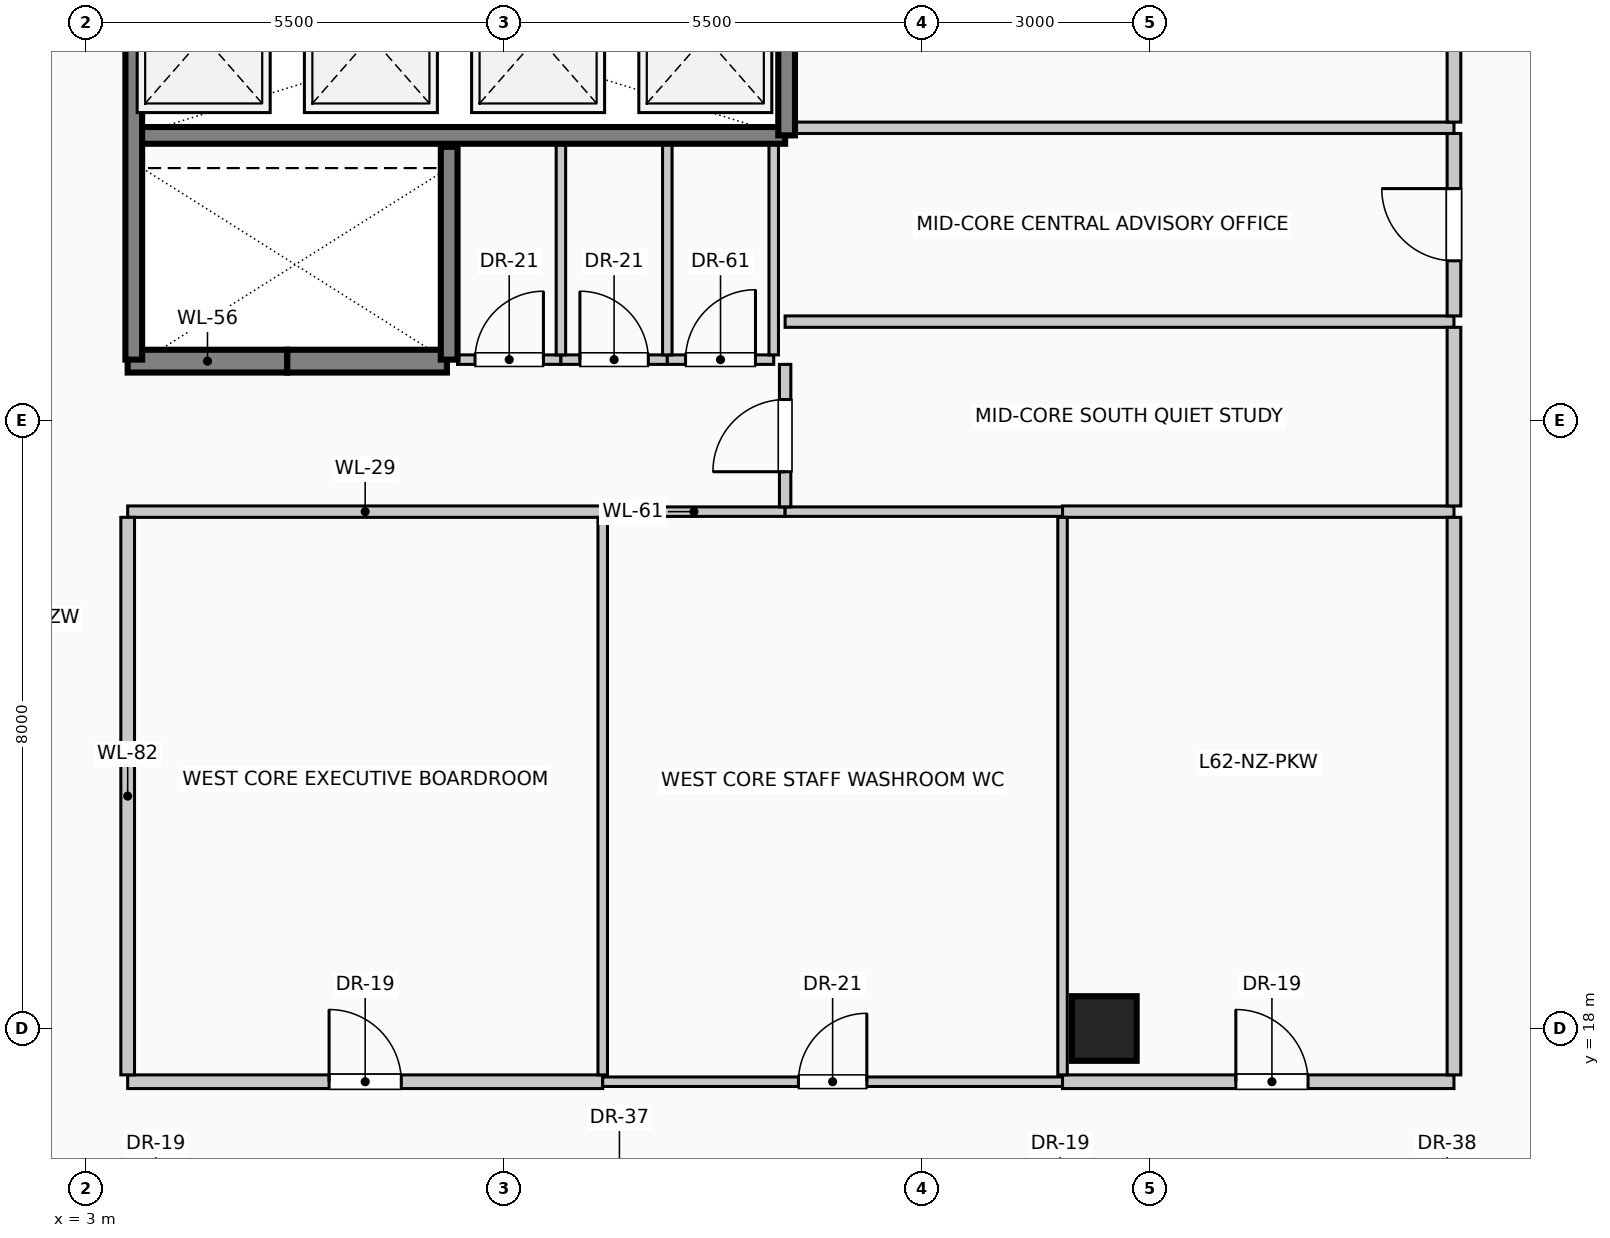
"""IFC4 building model, lengths in metres.
Left out: names, types, materials, properties, quantities, classifications, styles, units other than length and angle.
Written with IfcOpenShell. Run it as: python <this file> out.ifc"""

import sys

from ifc_helpers import new_model, si_unit, direction, frame, frame_2d, origin, origin_2d, place, context, subcontext, project, spatial, rectangle, circle, extrude, element, fill, save


model = new_model("IFC4")
c1 = context("Model", 3, precision=1e-05, world=origin(), true_north=direction((0.0, 1.0)))
c2 = subcontext(c1, "Body", "Model", "MODEL_VIEW")
j1 = project(units=[si_unit("LENGTHUNIT", "METRE"), si_unit("PLANEANGLEUNIT", "RADIAN")], contexts=[c1])
p1 = place(None, origin())
s1 = spatial("IfcSite", under=j1, at=p1, CompositionType="ELEMENT")
p2 = place(p1, origin())
s2 = spatial("IfcBuilding", under=s1, at=p2, CompositionType="ELEMENT")
p3 = place(p2, frame((0.0, 0.0, 256.6)))
s3 = spatial("IfcBuildingStorey", under=s2, at=p3, CompositionType="ELEMENT", Elevation=256.6)
p4 = place(p3, frame((16.4, 18.0, 0.0), z_axis=(0.0, 0.0, 1.0), x_axis=(1.0, 0.0, 0.0)))
e1 = element("IfcColumn", 1, at=p4, inside=s3, PredefinedType="COLUMN", context=c2, shape_type="SweptSolid", body=[
    extrude(circle(Radius=0.425, at=origin_2d()), origin(), (0.0, 0.0, 1.0), 4.0),
])
p5 = place(p3, frame((5.65, 26.78, 0.0), z_axis=(0.0, 0.0, 1.0), x_axis=(-1.0, 0.0, 0.0)))
e2 = element("IfcWall", 2, at=p5, inside=s3, PredefinedType="SOLIDWALL", context=c2, shape_type="SweptSolid", body=[
    extrude(rectangle(XDim=2.1, YDim=0.3, at=frame_2d((1.05, 0.0))), origin(), (0.0, 0.0, 1.0), 4.0),
])
p6 = place(p3, frame((7.75, 26.78, 0.0), z_axis=(0.0, 0.0, 1.0), x_axis=(-1.0, 0.0, 0.0)))
e3 = element("IfcWall", 3, at=p6, inside=s3, PredefinedType="SOLIDWALL", context=c2, shape_type="SweptSolid", body=[
    extrude(rectangle(XDim=2.1, YDim=0.3, at=frame_2d((1.05, 0.0))), origin(), (0.0, 0.0, 1.0), 4.0),
])
p7 = place(p3, frame((3.55, 29.75, 0.0), z_axis=(0.0, 0.0, 1.0), x_axis=(1.0, 0.0, 0.0)))
e4 = element("IfcWall", 4, at=p7, inside=s3, PredefinedType="SOLIDWALL", context=c2, shape_type="SweptSolid", body=[
    extrude(rectangle(XDim=8.65, YDim=0.22, at=frame_2d((4.325, 0.0))), origin(), (0.0, 0.0, 1.0), 4.0),
])
p8 = place(p3, frame((3.63, 26.8, 0.0), z_axis=(0.0, 0.0, 1.0), x_axis=(0.0, 1.0, 0.0)))
e5 = element("IfcWall", 5, at=p8, inside=s3, PredefinedType="SOLIDWALL", context=c2, shape_type="SweptSolid", body=[
    extrude(rectangle(XDim=5.55, YDim=0.22, at=frame_2d((2.775, 0.0))), origin(), (0.0, 0.0, 1.0), 4.0),
])
p9 = place(p3, frame((7.78, 26.8, 0.0), z_axis=(0.0, 0.0, 1.0), x_axis=(0.0, 1.0, 0.0)))
e6 = element("IfcWall", 6, at=p9, inside=s3, PredefinedType="SOLIDWALL", context=c2, shape_type="SweptSolid", body=[
    extrude(rectangle(XDim=2.8, YDim=0.22, at=frame_2d((1.4, 0.0))), origin(), (0.0, 0.0, 1.0), 4.0),
])
p10 = place(p3, frame((12.22, 29.75, 0.0), z_axis=(0.0, 0.0, 1.0), x_axis=(0.0, 1.0, 0.0)))
e7 = element("IfcWall", 7, at=p10, inside=s3, PredefinedType="SOLIDWALL", context=c2, shape_type="SweptSolid", body=[
    extrude(rectangle(XDim=2.6, YDim=0.22, at=frame_2d((1.3, 0.0))), origin(), (0.0, 0.0, 1.0), 4.0),
])
p11 = place(p3, frame((3.55, 17.3, 0.0), z_axis=(0.0, 0.0, 1.0), x_axis=(1.0, 0.0, 0.0)))
e8 = element("IfcWall", 8, at=p11, inside=s3, PredefinedType="PARTITIONING", context=c2, shape_type="SweptSolid", body=[
    extrude(rectangle(XDim=6.25, YDim=0.18, at=frame_2d((3.125, 0.0))), origin(), (0.0, 0.0, 1.0), 3.75),
])
p12 = place(p11, frame((2.65, 0.0, 0.0)))
e9 = element("IfcOpeningElement", 9, at=p12, cuts=e8, PredefinedType="OPENING", context=c2, shape_type="SweptSolid", body=[
    extrude(rectangle(XDim=0.95, YDim=2.15, at=frame_2d((0.475, 1.075))), frame((0.0, 0.1, 0.0), z_axis=(0.0, -1.0, 0.0), x_axis=(1.0, 0.0, 0.0)), (0.0, 0.0, 1.0), 0.2),
])
p13 = place(p3, frame((9.8, 17.3, 0.0), z_axis=(0.0, 0.0, 1.0), x_axis=(1.0, 0.0, 0.0)))
e10 = element("IfcWall", 10, at=p13, inside=s3, PredefinedType="PARTITIONING", context=c2, shape_type="SweptSolid", body=[
    extrude(rectangle(XDim=6.05, YDim=0.125, at=frame_2d((3.025, 0.0))), origin(), (0.0, 0.0, 1.0), 3.75),
])
p14 = place(p13, frame((2.575, 0.0, 0.0)))
e11 = element("IfcOpeningElement", 11, at=p14, cuts=e10, PredefinedType="OPENING", context=c2, shape_type="SweptSolid", body=[
    extrude(rectangle(XDim=0.9, YDim=2.1, at=frame_2d((0.45, 1.05))), frame((0.0, 0.073, 0.0), z_axis=(0.0, -1.0, 0.0), x_axis=(1.0, 0.0, 0.0)), (0.0, 0.0, 1.0), 0.145),
])
p15 = place(p3, frame((15.85, 17.3, 0.0), z_axis=(0.0, 0.0, 1.0), x_axis=(1.0, 0.0, 0.0)))
e12 = element("IfcWall", 12, at=p15, inside=s3, PredefinedType="PARTITIONING", context=c2, shape_type="SweptSolid", body=[
    extrude(rectangle(XDim=5.15, YDim=0.18, at=frame_2d((2.575, 0.0))), origin(), (0.0, 0.0, 1.0), 3.75),
])
p16 = place(p15, frame((2.28, 0.0, 0.0)))
e13 = element("IfcOpeningElement", 13, at=p16, cuts=e12, PredefinedType="OPENING", context=c2, shape_type="SweptSolid", body=[
    extrude(rectangle(XDim=0.95, YDim=2.15, at=frame_2d((0.475, 1.075))), frame((0.0, 0.1, 0.0), z_axis=(0.0, -1.0, 0.0), x_axis=(1.0, 0.0, 0.0)), (0.0, 0.0, 1.0), 0.2),
])
p17 = place(p3, frame((3.55, 24.8, 0.0), z_axis=(0.0, 0.0, 1.0), x_axis=(1.0, 0.0, 0.0)))
e14 = element("IfcWall", 14, at=p17, inside=s3, PredefinedType="PARTITIONING", context=c2, shape_type="SweptSolid", body=[
    extrude(rectangle(XDim=6.25, YDim=0.15, at=frame_2d((3.125, 0.0))), origin(), (0.0, 0.0, 1.0), 3.75),
])
p18 = place(p3, frame((9.8, 24.8, 0.0), z_axis=(0.0, 0.0, 1.0), x_axis=(1.0, 0.0, 0.0)))
e15 = element("IfcWall", 15, at=p18, inside=s3, PredefinedType="PARTITIONING", context=c2, shape_type="SweptSolid", body=[
    extrude(rectangle(XDim=2.4, YDim=0.125, at=frame_2d((1.2, 0.0))), origin(), (0.0, 0.0, 1.0), 3.75),
])
p19 = place(p3, frame((12.2, 24.8, 0.0), z_axis=(0.0, 0.0, 1.0), x_axis=(1.0, 0.0, 0.0)))
e16 = element("IfcWall", 16, at=p19, inside=s3, PredefinedType="PARTITIONING", context=c2, shape_type="SweptSolid", body=[
    extrude(rectangle(XDim=3.65, YDim=0.125, at=frame_2d((1.825, 0.0))), origin(), (0.0, 0.0, 1.0), 3.75),
])
p20 = place(p3, frame((15.85, 24.8, 0.0), z_axis=(0.0, 0.0, 1.0), x_axis=(1.0, 0.0, 0.0)))
e17 = element("IfcWall", 17, at=p20, inside=s3, PredefinedType="PARTITIONING", context=c2, shape_type="SweptSolid", body=[
    extrude(rectangle(XDim=5.15, YDim=0.15, at=frame_2d((2.575, 0.0))), origin(), (0.0, 0.0, 1.0), 3.75),
])
p21 = place(p3, frame((7.89, 26.8, 0.0), z_axis=(0.0, 0.0, 1.0), x_axis=(1.0, 0.0, 0.0)))
e18 = element("IfcWall", 18, at=p21, inside=s3, PredefinedType="PARTITIONING", context=c2, shape_type="SweptSolid", body=[
    extrude(rectangle(XDim=1.36, YDim=0.125, at=frame_2d((0.68, 0.0))), origin(), (0.0, 0.0, 1.0), 3.75),
])
p22 = place(p21, frame((0.23, 0.0, 0.0)))
e19 = element("IfcOpeningElement", 19, at=p22, cuts=e18, PredefinedType="OPENING", context=c2, shape_type="SweptSolid", body=[
    extrude(rectangle(XDim=0.9, YDim=2.1, at=frame_2d((0.45, 1.05))), frame((0.0, 0.073, 0.0), z_axis=(0.0, -1.0, 0.0), x_axis=(1.0, 0.0, 0.0)), (0.0, 0.0, 1.0), 0.145),
])
p23 = place(p3, frame((9.25, 26.8, 0.0), z_axis=(0.0, 0.0, 1.0), x_axis=(1.0, 0.0, 0.0)))
e20 = element("IfcWall", 20, at=p23, inside=s3, PredefinedType="PARTITIONING", context=c2, shape_type="SweptSolid", body=[
    extrude(rectangle(XDim=1.4, YDim=0.125, at=frame_2d((0.7, 0.0))), origin(), (0.0, 0.0, 1.0), 3.75),
])
p24 = place(p23, frame((0.25, 0.0, 0.0)))
e21 = element("IfcOpeningElement", 21, at=p24, cuts=e20, PredefinedType="OPENING", context=c2, shape_type="SweptSolid", body=[
    extrude(rectangle(XDim=0.9, YDim=2.1, at=frame_2d((0.45, 1.05))), frame((0.0, 0.073, 0.0), z_axis=(0.0, -1.0, 0.0), x_axis=(1.0, 0.0, 0.0)), (0.0, 0.0, 1.0), 0.145),
])
p25 = place(p3, frame((10.65, 26.8, 0.0), z_axis=(0.0, 0.0, 1.0), x_axis=(1.0, 0.0, 0.0)))
e22 = element("IfcWall", 22, at=p25, inside=s3, PredefinedType="PARTITIONING", context=c2, shape_type="SweptSolid", body=[
    extrude(rectangle(XDim=1.4, YDim=0.125, at=frame_2d((0.7, 0.0))), origin(), (0.0, 0.0, 1.0), 3.75),
])
p26 = place(p25, frame((0.24, 0.0, 0.0)))
e23 = element("IfcOpeningElement", 23, at=p26, cuts=e22, PredefinedType="OPENING", context=c2, shape_type="SweptSolid", body=[
    extrude(rectangle(XDim=0.92, YDim=2.1, at=frame_2d((0.46, 1.05))), frame((0.0, 0.073, 0.0), z_axis=(0.0, -1.0, 0.0), x_axis=(1.0, 0.0, 0.0)), (0.0, 0.0, 1.0), 0.145),
])
p27 = place(p3, frame((12.2, 27.3, 0.0), z_axis=(0.0, 0.0, 1.0), x_axis=(1.0, 0.0, 0.0)))
e24 = element("IfcWall", 24, at=p27, inside=s3, PredefinedType="PARTITIONING", context=c2, shape_type="SweptSolid", body=[
    extrude(rectangle(XDim=8.8, YDim=0.15, at=frame_2d((4.4, 0.0))), origin(), (0.0, 0.0, 1.0), 3.75),
])
p28 = place(p3, frame((12.33, 29.85, 0.0), z_axis=(0.0, 0.0, 1.0), x_axis=(1.0, 0.0, 0.0)))
e25 = element("IfcWall", 25, at=p28, inside=s3, PredefinedType="PARTITIONING", context=c2, shape_type="SweptSolid", body=[
    extrude(rectangle(XDim=8.67, YDim=0.15, at=frame_2d((4.335, 0.0))), origin(), (0.0, 0.0, 1.0), 3.75),
])
p29 = place(p3, frame((3.55, 17.39, 0.0), z_axis=(0.0, 0.0, 1.0), x_axis=(0.0, 1.0, 0.0)))
e26 = element("IfcWall", 26, at=p29, inside=s3, PredefinedType="PARTITIONING", context=c2, shape_type="SweptSolid", body=[
    extrude(rectangle(XDim=7.335, YDim=0.18, at=frame_2d((3.667, 0.0))), origin(), (0.0, 0.0, 1.0), 3.75),
])
p30 = place(p3, frame((9.25, 26.863, 0.0), z_axis=(0.0, 0.0, 1.0), x_axis=(0.0, 1.0, 0.0)))
e27 = element("IfcWall", 27, at=p30, inside=s3, PredefinedType="PARTITIONING", context=c2, shape_type="SweptSolid", body=[
    extrude(rectangle(XDim=2.777, YDim=0.125, at=frame_2d((1.389, 0.0))), origin(), (0.0, 0.0, 1.0), 3.75),
])
p31 = place(p3, frame((9.8, 17.39, 0.0), z_axis=(0.0, 0.0, 1.0), x_axis=(0.0, 1.0, 0.0)))
e28 = element("IfcWall", 28, at=p31, inside=s3, PredefinedType="PARTITIONING", context=c2, shape_type="SweptSolid", body=[
    extrude(rectangle(XDim=7.335, YDim=0.125, at=frame_2d((3.667, 0.0))), origin(), (0.0, 0.0, 1.0), 3.75),
])
for number, where, z_axis, x_axis in (
    (29, (10.65, 26.863, 0.0), (0.0, 0.0, 1.0), (0.0, 1.0, 0.0)),
    (30, (12.05, 26.863, 0.0), (0.0, 0.0, 1.0), (0.0, 1.0, 0.0)),
):
    element("IfcWall", number, at=place(p3, frame(where, z_axis=z_axis, x_axis=x_axis)), inside=s3, PredefinedType="PARTITIONING", context=c2, shape_type="SweptSolid", body=[
        extrude(rectangle(XDim=2.777, YDim=0.125, at=frame_2d((1.389, 0.0))), origin(), (0.0, 0.0, 1.0), 3.75),
    ])
p32 = place(p3, frame((12.2, 24.863, 0.0), z_axis=(0.0, 0.0, 1.0), x_axis=(0.0, 1.0, 0.0)))
e31 = element("IfcWall", 31, at=p32, inside=s3, PredefinedType="PARTITIONING", context=c2, shape_type="SweptSolid", body=[
    extrude(rectangle(XDim=1.875, YDim=0.15, at=frame_2d((0.938, 0.0))), origin(), (0.0, 0.0, 1.0), 3.75),
])
p33 = place(p32, frame((0.462, 0.0, 0.0)))
e32 = element("IfcOpeningElement", 32, at=p33, cuts=e31, PredefinedType="OPENING", context=c2, shape_type="SweptSolid", body=[
    extrude(rectangle(XDim=0.95, YDim=2.15, at=frame_2d((0.475, 1.075))), frame((0.0, 0.085, 0.0), z_axis=(0.0, -1.0, 0.0), x_axis=(1.0, 0.0, 0.0)), (0.0, 0.0, 1.0), 0.17),
])
p34 = place(p3, frame((15.85, 17.39, 0.0), z_axis=(0.0, 0.0, 1.0), x_axis=(0.0, 1.0, 0.0)))
e33 = element("IfcWall", 33, at=p34, inside=s3, PredefinedType="PARTITIONING", context=c2, shape_type="SweptSolid", body=[
    extrude(rectangle(XDim=7.335, YDim=0.125, at=frame_2d((3.667, 0.0))), origin(), (0.0, 0.0, 1.0), 3.75),
])
p35 = place(p3, frame((21.0, 17.39, 0.0), z_axis=(0.0, 0.0, 1.0), x_axis=(0.0, 1.0, 0.0)))
e34 = element("IfcWall", 34, at=p35, inside=s3, PredefinedType="PARTITIONING", context=c2, shape_type="SweptSolid", body=[
    extrude(rectangle(XDim=7.335, YDim=0.18, at=frame_2d((3.667, 0.0))), origin(), (0.0, 0.0, 1.0), 3.75),
])
p36 = place(p3, frame((21.0, 24.875, 0.0), z_axis=(0.0, 0.0, 1.0), x_axis=(0.0, 1.0, 0.0)))
e35 = element("IfcWall", 35, at=p36, inside=s3, PredefinedType="PARTITIONING", context=c2, shape_type="SweptSolid", body=[
    extrude(rectangle(XDim=2.35, YDim=0.18, at=frame_2d((1.175, 0.0))), origin(), (0.0, 0.0, 1.0), 3.75),
])
p37 = place(p3, frame((21.0, 27.375, 0.0), z_axis=(0.0, 0.0, 1.0), x_axis=(0.0, 1.0, 0.0)))
e36 = element("IfcWall", 36, at=p37, inside=s3, PredefinedType="PARTITIONING", context=c2, shape_type="SweptSolid", body=[
    extrude(rectangle(XDim=2.4, YDim=0.18, at=frame_2d((1.2, 0.0))), origin(), (0.0, 0.0, 1.0), 3.75),
])
p38 = place(p37, frame((0.725, 0.0, 0.0)))
e37 = element("IfcOpeningElement", 37, at=p38, cuts=e36, PredefinedType="OPENING", context=c2, shape_type="SweptSolid", body=[
    extrude(rectangle(XDim=0.95, YDim=2.15, at=frame_2d((0.475, 1.075))), frame((0.0, 0.1, 0.0), z_axis=(0.0, -1.0, 0.0), x_axis=(1.0, 0.0, 0.0)), (0.0, 0.0, 1.0), 0.2),
])
p39 = place(p3, frame((21.0, 29.925, 0.0), z_axis=(0.0, 0.0, 1.0), x_axis=(0.0, 1.0, 0.0)))
e38 = element("IfcWall", 38, at=p39, inside=s3, PredefinedType="PARTITIONING", context=c2, shape_type="SweptSolid", body=[
    extrude(rectangle(XDim=2.335, YDim=0.18, at=frame_2d((1.167, 0.0))), origin(), (0.0, 0.0, 1.0), 3.75),
])
p40 = place(p12, origin())
e39 = element("IfcDoor", 39, at=p40, inside=s3, OperationType="SINGLE_SWING_LEFT", PredefinedType="DOOR", context=c2, shape_type="SweptSolid", body=[
    extrude(rectangle(XDim=0.95, YDim=2.15, at=frame_2d((0.475, 1.075))), frame((0.0, 0.025, 0.0), z_axis=(0.0, -1.0, 0.0), x_axis=(1.0, 0.0, 0.0)), (0.0, 0.0, 1.0), 0.05),
])
fill(e9, e39)
p41 = place(p14, origin())
e40 = element("IfcDoor", 40, at=p41, inside=s3, OperationType="SINGLE_SWING_RIGHT", PredefinedType="DOOR", context=c2, shape_type="SweptSolid", body=[
    extrude(rectangle(XDim=0.9, YDim=2.1, at=frame_2d((0.45, 1.05))), frame((0.0, 0.025, 0.0), z_axis=(0.0, -1.0, 0.0), x_axis=(1.0, 0.0, 0.0)), (0.0, 0.0, 1.0), 0.05),
])
fill(e11, e40)
p42 = place(p16, origin())
e41 = element("IfcDoor", 41, at=p42, inside=s3, OperationType="SINGLE_SWING_LEFT", PredefinedType="DOOR", context=c2, shape_type="SweptSolid", body=[
    extrude(rectangle(XDim=0.95, YDim=2.15, at=frame_2d((0.475, 1.075))), frame((0.0, 0.025, 0.0), z_axis=(0.0, -1.0, 0.0), x_axis=(1.0, 0.0, 0.0)), (0.0, 0.0, 1.0), 0.05),
])
fill(e13, e41)
p43 = place(p22, origin())
e42 = element("IfcDoor", 42, at=p43, inside=s3, OperationType="SINGLE_SWING_RIGHT", PredefinedType="DOOR", context=c2, shape_type="SweptSolid", body=[
    extrude(rectangle(XDim=0.9, YDim=2.1, at=frame_2d((0.45, 1.05))), frame((0.0, 0.025, 0.0), z_axis=(0.0, -1.0, 0.0), x_axis=(1.0, 0.0, 0.0)), (0.0, 0.0, 1.0), 0.05),
])
fill(e19, e42)
p44 = place(p24, origin())
e43 = element("IfcDoor", 43, at=p44, inside=s3, OperationType="SINGLE_SWING_LEFT", PredefinedType="DOOR", context=c2, shape_type="SweptSolid", body=[
    extrude(rectangle(XDim=0.9, YDim=2.1, at=frame_2d((0.45, 1.05))), frame((0.0, 0.025, 0.0), z_axis=(0.0, -1.0, 0.0), x_axis=(1.0, 0.0, 0.0)), (0.0, 0.0, 1.0), 0.05),
])
fill(e21, e43)
p45 = place(p26, origin())
e44 = element("IfcDoor", 44, at=p45, inside=s3, OperationType="SINGLE_SWING_RIGHT", PredefinedType="DOOR", context=c2, shape_type="SweptSolid", body=[
    extrude(rectangle(XDim=0.92, YDim=2.1, at=frame_2d((0.46, 1.05))), frame((0.0, 0.025, 0.0), z_axis=(0.0, -1.0, 0.0), x_axis=(1.0, 0.0, 0.0)), (0.0, 0.0, 1.0), 0.05),
])
fill(e23, e44)
p46 = place(p33, origin())
e45 = element("IfcDoor", 45, at=p46, inside=s3, OperationType="SINGLE_SWING_LEFT", PredefinedType="DOOR", context=c2, shape_type="SweptSolid", body=[
    extrude(rectangle(XDim=0.95, YDim=2.15, at=frame_2d((0.475, 1.075))), frame((0.0, 0.025, 0.0), z_axis=(0.0, -1.0, 0.0), x_axis=(1.0, 0.0, 0.0)), (0.0, 0.0, 1.0), 0.05),
])
fill(e32, e45)
p47 = place(p38, origin())
e46 = element("IfcDoor", 46, at=p47, inside=s3, OperationType="SINGLE_SWING_RIGHT", PredefinedType="DOOR", context=c2, shape_type="SweptSolid", body=[
    extrude(rectangle(XDim=0.95, YDim=2.15, at=frame_2d((0.475, 1.075))), frame((0.0, 0.025, 0.0), z_axis=(0.0, -1.0, 0.0), x_axis=(1.0, 0.0, 0.0)), (0.0, 0.0, 1.0), 0.05),
])
fill(e37, e46)
save(model, sys.argv[1])
